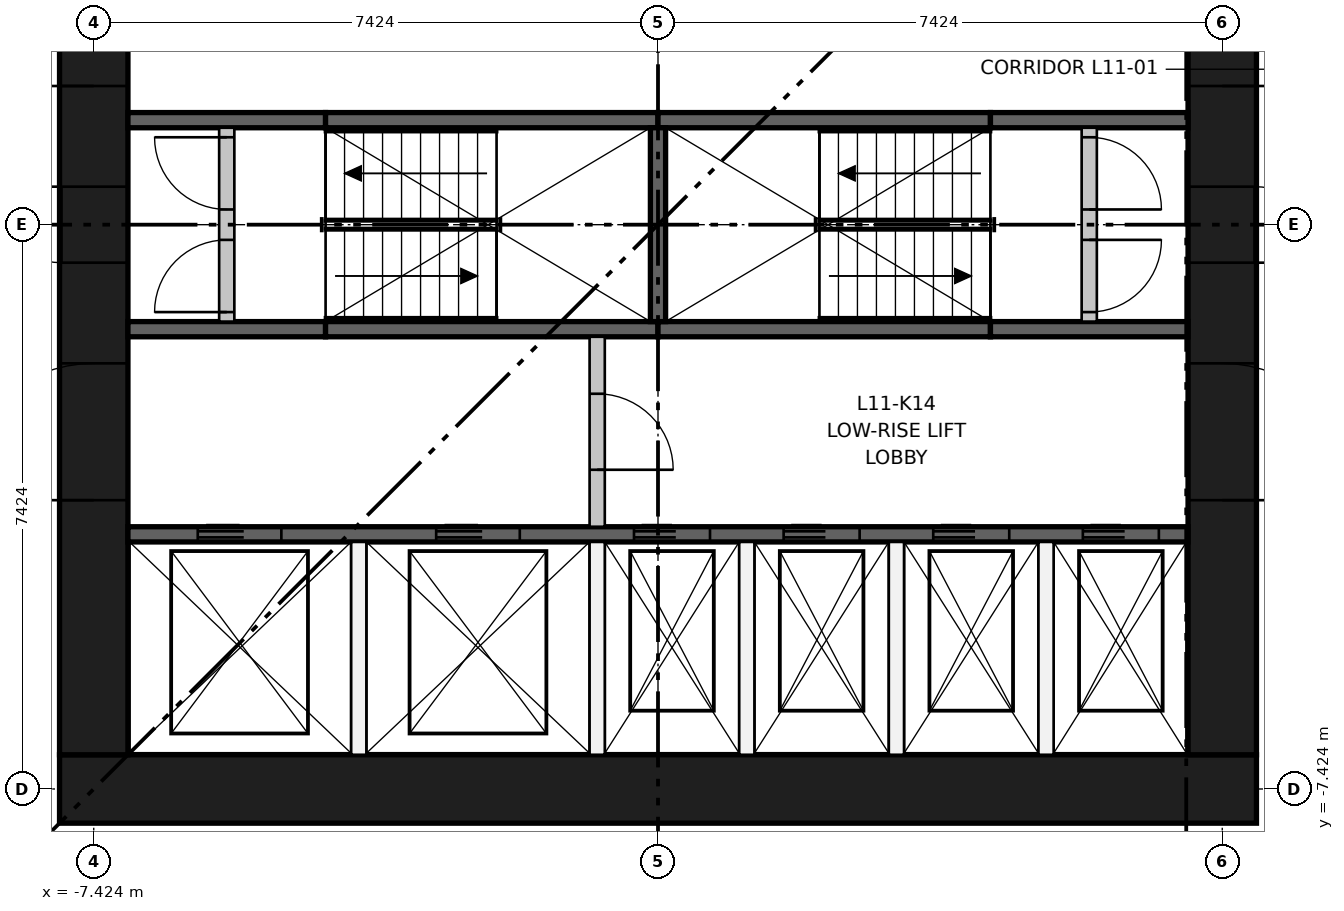
"""IFC4 building model, lengths in metres.
Left out: names, types, materials, properties, quantities, classifications, styles, units other than length and angle.
Written with IfcOpenShell. Run it as: python <this file> out.ifc"""

import sys

from ifc_helpers import new_model, si_unit, direction, frame, frame_2d, origin, place, context, subcontext, project, spatial, rectangle, extrude, element, fill, save


model = new_model("IFC4")
c1 = context("Model", 3, precision=1e-05, world=origin(), true_north=direction((0.0, 1.0)))
c2 = subcontext(c1, "Body", "Model", "MODEL_VIEW")
j1 = project(units=[si_unit("LENGTHUNIT", "METRE"), si_unit("PLANEANGLEUNIT", "RADIAN")], contexts=[c1])
p1 = place(None, origin())
s1 = spatial("IfcSite", under=j1, at=p1, CompositionType="ELEMENT")
p2 = place(p1, origin())
s2 = spatial("IfcBuilding", under=s1, at=p2, CompositionType="ELEMENT")
p3 = place(p2, frame((0.0, 0.0, 44.45)))
s3 = spatial("IfcBuildingStorey", under=s2, at=p3, CompositionType="ELEMENT", Elevation=44.45)
p4 = place(p3, frame((-7.874, -7.424, 0.0), z_axis=(0.0, 0.0, 1.0), x_axis=(1.0, 0.0, 0.0)))
e1 = element("IfcWall", 1, at=p4, inside=s3, PredefinedType="SHEAR", context=c2, shape_type="SweptSolid", body=[
    extrude(rectangle(XDim=15.748, YDim=0.9, at=frame_2d((7.874, 0.0))), origin(), (0.0, 0.0, 1.0), 3.65),
])
p5 = place(p3, frame((-7.424, -6.974, 0.0), z_axis=(0.0, 0.0, 1.0), x_axis=(0.0, 1.0, 0.0)))
e2 = element("IfcWall", 2, at=p5, inside=s3, PredefinedType="SHEAR", context=c2, shape_type="SweptSolid", body=[
    extrude(rectangle(XDim=13.948, YDim=0.9, at=frame_2d((6.974, 0.0))), origin(), (0.0, 0.0, 1.0), 3.65),
])
p6 = place(p5, frame((6.474, 0.0, 0.0)))
e3 = element("IfcOpeningElement", 3, at=p6, cuts=e2, PredefinedType="OPENING", context=c2, shape_type="SweptSolid", body=[
    extrude(rectangle(XDim=1.0, YDim=2.1, at=frame_2d((0.5, 1.05))), frame((0.0, 0.46, 0.0), z_axis=(0.0, -1.0, 0.0), x_axis=(1.0, 0.0, 0.0)), (0.0, 0.0, 1.0), 0.92),
])
p7 = place(p5, frame((3.35, 0.0, 0.0)))
e4 = element("IfcOpeningElement", 4, at=p7, cuts=e2, PredefinedType="OPENING", context=c2, shape_type="SweptSolid", body=[
    extrude(rectangle(XDim=1.8, YDim=2.1, at=frame_2d((0.9, 1.05))), frame((0.0, 0.46, 0.0), z_axis=(0.0, -1.0, 0.0), x_axis=(1.0, 0.0, 0.0)), (0.0, 0.0, 1.0), 0.92),
])
p8 = place(p5, frame((8.799, 0.0, 0.0)))
e5 = element("IfcOpeningElement", 5, at=p8, cuts=e2, PredefinedType="OPENING", context=c2, shape_type="SweptSolid", body=[
    extrude(rectangle(XDim=1.8, YDim=2.1, at=frame_2d((0.9, 1.05))), frame((0.0, 0.46, 0.0), z_axis=(0.0, -1.0, 0.0), x_axis=(1.0, 0.0, 0.0)), (0.0, 0.0, 1.0), 0.92),
])
p9 = place(p5, frame((11.974, 0.0, 0.0)))
e6 = element("IfcOpeningElement", 6, at=p9, cuts=e2, PredefinedType="OPENING", context=c2, shape_type="SweptSolid", body=[
    extrude(rectangle(XDim=1.0, YDim=2.1, at=frame_2d((0.5, 1.05))), frame((0.0, 0.46, 0.0), z_axis=(0.0, -1.0, 0.0), x_axis=(1.0, 0.0, 0.0)), (0.0, 0.0, 1.0), 0.92),
])
p10 = place(p3, frame((7.424, -6.974, 0.0), z_axis=(0.0, 0.0, 1.0), x_axis=(0.0, 1.0, 0.0)))
e7 = element("IfcWall", 7, at=p10, inside=s3, PredefinedType="SHEAR", context=c2, shape_type="SweptSolid", body=[
    extrude(rectangle(XDim=13.948, YDim=0.9, at=frame_2d((6.974, 0.0))), origin(), (0.0, 0.0, 1.0), 3.65),
])
p11 = place(p10, frame((6.474, 0.0, 0.0)))
e8 = element("IfcOpeningElement", 8, at=p11, cuts=e7, PredefinedType="OPENING", context=c2, shape_type="SweptSolid", body=[
    extrude(rectangle(XDim=1.0, YDim=2.1, at=frame_2d((0.5, 1.05))), frame((0.0, 0.46, 0.0), z_axis=(0.0, -1.0, 0.0), x_axis=(1.0, 0.0, 0.0)), (0.0, 0.0, 1.0), 0.92),
])
p12 = place(p10, frame((3.35, 0.0, 0.0)))
e9 = element("IfcOpeningElement", 9, at=p12, cuts=e7, PredefinedType="OPENING", context=c2, shape_type="SweptSolid", body=[
    extrude(rectangle(XDim=1.8, YDim=2.1, at=frame_2d((0.9, 1.05))), frame((0.0, 0.46, 0.0), z_axis=(0.0, -1.0, 0.0), x_axis=(1.0, 0.0, 0.0)), (0.0, 0.0, 1.0), 0.92),
])
p13 = place(p10, frame((8.799, 0.0, 0.0)))
e10 = element("IfcOpeningElement", 10, at=p13, cuts=e7, PredefinedType="OPENING", context=c2, shape_type="SweptSolid", body=[
    extrude(rectangle(XDim=1.8, YDim=2.1, at=frame_2d((0.9, 1.05))), frame((0.0, 0.46, 0.0), z_axis=(0.0, -1.0, 0.0), x_axis=(1.0, 0.0, 0.0)), (0.0, 0.0, 1.0), 0.92),
])
p14 = place(p3, frame((-6.974, -4.074, 0.0), z_axis=(0.0, 0.0, 1.0), x_axis=(1.0, 0.0, 0.0)))
e11 = element("IfcWall", 11, at=p14, inside=s3, PredefinedType="SHEAR", context=c2, shape_type="SweptSolid", body=[
    extrude(rectangle(XDim=13.948, YDim=0.2, at=frame_2d((6.974, 0.0))), origin(), (0.0, 0.0, 1.0), 3.3),
])
p15 = place(p14, frame((0.918, 0.0, 0.0)))
e12 = element("IfcOpeningElement", 12, at=p15, cuts=e11, PredefinedType="OPENING", context=c2, shape_type="SweptSolid", body=[
    extrude(rectangle(XDim=1.1, YDim=2.1, at=frame_2d((0.55, 1.05))), frame((0.0, 0.11, 0.0), z_axis=(0.0, -1.0, 0.0), x_axis=(1.0, 0.0, 0.0)), (0.0, 0.0, 1.0), 0.22),
])
p16 = place(p14, frame((4.055, 0.0, 0.0)))
e13 = element("IfcOpeningElement", 13, at=p16, cuts=e11, PredefinedType="OPENING", context=c2, shape_type="SweptSolid", body=[
    extrude(rectangle(XDim=1.1, YDim=2.1, at=frame_2d((0.55, 1.05))), frame((0.0, 0.11, 0.0), z_axis=(0.0, -1.0, 0.0), x_axis=(1.0, 0.0, 0.0)), (0.0, 0.0, 1.0), 0.22),
])
p17 = place(p14, frame((6.658, 0.0, 0.0)))
e14 = element("IfcOpeningElement", 14, at=p17, cuts=e11, PredefinedType="OPENING", context=c2, shape_type="SweptSolid", body=[
    extrude(rectangle(XDim=1.0, YDim=2.1, at=frame_2d((0.5, 1.05))), frame((0.0, 0.11, 0.0), z_axis=(0.0, -1.0, 0.0), x_axis=(1.0, 0.0, 0.0)), (0.0, 0.0, 1.0), 0.22),
])
p18 = place(p14, frame((8.627, 0.0, 0.0)))
e15 = element("IfcOpeningElement", 15, at=p18, cuts=e11, PredefinedType="OPENING", context=c2, shape_type="SweptSolid", body=[
    extrude(rectangle(XDim=1.0, YDim=2.1, at=frame_2d((0.5, 1.05))), frame((0.0, 0.11, 0.0), z_axis=(0.0, -1.0, 0.0), x_axis=(1.0, 0.0, 0.0)), (0.0, 0.0, 1.0), 0.22),
])
p19 = place(p14, frame((10.595, 0.0, 0.0)))
e16 = element("IfcOpeningElement", 16, at=p19, cuts=e11, PredefinedType="OPENING", context=c2, shape_type="SweptSolid", body=[
    extrude(rectangle(XDim=1.0, YDim=2.1, at=frame_2d((0.5, 1.05))), frame((0.0, 0.11, 0.0), z_axis=(0.0, -1.0, 0.0), x_axis=(1.0, 0.0, 0.0)), (0.0, 0.0, 1.0), 0.22),
])
p20 = place(p14, frame((12.564, 0.0, 0.0)))
e17 = element("IfcOpeningElement", 17, at=p20, cuts=e11, PredefinedType="OPENING", context=c2, shape_type="SweptSolid", body=[
    extrude(rectangle(XDim=1.0, YDim=2.1, at=frame_2d((0.5, 1.05))), frame((0.0, 0.11, 0.0), z_axis=(0.0, -1.0, 0.0), x_axis=(1.0, 0.0, 0.0)), (0.0, 0.0, 1.0), 0.22),
])
p21 = place(p3, frame((-6.974, -1.375, 0.0), z_axis=(0.0, 0.0, 1.0), x_axis=(1.0, 0.0, 0.0)))
e18 = element("IfcWall", 18, at=p21, inside=s3, PredefinedType="SHEAR", context=c2, shape_type="SweptSolid", body=[
    extrude(rectangle(XDim=2.6, YDim=0.2, at=frame_2d((1.3, 0.0))), origin(), (0.0, 0.0, 1.0), 3.3),
])
for number, where, z_axis, x_axis in (
    (19, (-4.374, -1.375, 0.0), (0.0, 0.0, 1.0), (1.0, 0.0, 0.0)),
    (20, (0.0, -1.375, 0.0), (0.0, 0.0, 1.0), (1.0, 0.0, 0.0)),
):
    element("IfcWall", number, at=place(p3, frame(where, z_axis=z_axis, x_axis=x_axis)), inside=s3, PredefinedType="SHEAR", context=c2, shape_type="SweptSolid", body=[
        extrude(rectangle(XDim=4.374, YDim=0.2, at=frame_2d((2.187, 0.0))), origin(), (0.0, 0.0, 1.0), 3.3),
    ])
for number, where, z_axis, x_axis in (
    (21, (4.374, -1.375, 0.0), (0.0, 0.0, 1.0), (1.0, 0.0, 0.0)),
    (22, (-6.974, 1.375, 0.0), (0.0, 0.0, 1.0), (1.0, 0.0, 0.0)),
):
    element("IfcWall", number, at=place(p3, frame(where, z_axis=z_axis, x_axis=x_axis)), inside=s3, PredefinedType="SHEAR", context=c2, shape_type="SweptSolid", body=[
        extrude(rectangle(XDim=2.6, YDim=0.2, at=frame_2d((1.3, 0.0))), origin(), (0.0, 0.0, 1.0), 3.3),
    ])
for number, where, z_axis, x_axis in (
    (23, (-4.374, 1.375, 0.0), (0.0, 0.0, 1.0), (1.0, 0.0, 0.0)),
    (24, (0.0, 1.375, 0.0), (0.0, 0.0, 1.0), (1.0, 0.0, 0.0)),
):
    element("IfcWall", number, at=place(p3, frame(where, z_axis=z_axis, x_axis=x_axis)), inside=s3, PredefinedType="SHEAR", context=c2, shape_type="SweptSolid", body=[
        extrude(rectangle(XDim=4.374, YDim=0.2, at=frame_2d((2.187, 0.0))), origin(), (0.0, 0.0, 1.0), 3.3),
    ])
p22 = place(p3, frame((4.374, 1.375, 0.0), z_axis=(0.0, 0.0, 1.0), x_axis=(1.0, 0.0, 0.0)))
e25 = element("IfcWall", 25, at=p22, inside=s3, PredefinedType="SHEAR", context=c2, shape_type="SweptSolid", body=[
    extrude(rectangle(XDim=2.6, YDim=0.2, at=frame_2d((1.3, 0.0))), origin(), (0.0, 0.0, 1.0), 3.3),
])
p23 = place(p3, frame((0.0, -1.275, 0.0), z_axis=(0.0, 0.0, 1.0), x_axis=(0.0, 1.0, 0.0)))
e26 = element("IfcWall", 26, at=p23, inside=s3, PredefinedType="SHEAR", context=c2, shape_type="SweptSolid", body=[
    extrude(rectangle(XDim=2.55, YDim=0.2, at=frame_2d((1.275, 0.0))), origin(), (0.0, 0.0, 1.0), 3.3),
])
for number, where, z_axis, x_axis in (
    (27, (-3.937, -6.974, 0.0), (0.0, 0.0, 1.0), (0.0, 1.0, 0.0)),
    (28, (-0.8, -6.974, 0.0), (0.0, 0.0, 1.0), (0.0, 1.0, 0.0)),
):
    element("IfcWall", number, at=place(p3, frame(where, z_axis=z_axis, x_axis=x_axis)), inside=s3, PredefinedType="PARTITIONING", context=c2, shape_type="SweptSolid", body=[
        extrude(rectangle(XDim=2.8, YDim=0.2, at=frame_2d((1.4, 0.0))), origin(), (0.0, 0.0, 1.0), 3.3),
    ])
p24 = place(p3, frame((-0.8, -3.974, 0.0), z_axis=(0.0, 0.0, 1.0), x_axis=(0.0, 1.0, 0.0)))
e29 = element("IfcWall", 29, at=p24, inside=s3, PredefinedType="PARTITIONING", context=c2, shape_type="SweptSolid", body=[
    extrude(rectangle(XDim=2.499, YDim=0.2, at=frame_2d((1.25, 0.0))), origin(), (0.0, 0.0, 1.0), 3.3),
])
p25 = place(p24, frame((0.75, 0.0, 0.0)))
e30 = element("IfcOpeningElement", 30, at=p25, cuts=e29, PredefinedType="OPENING", context=c2, shape_type="SweptSolid", body=[
    extrude(rectangle(XDim=1.0, YDim=2.1, at=frame_2d((0.5, 1.05))), frame((0.0, 0.11, 0.0), z_axis=(0.0, -1.0, 0.0), x_axis=(1.0, 0.0, 0.0)), (0.0, 0.0, 1.0), 0.22),
])
for number, where, z_axis, x_axis in (
    (31, (1.168, -6.974, 0.0), (0.0, 0.0, 1.0), (0.0, 1.0, 0.0)),
    (32, (3.137, -6.974, 0.0), (0.0, 0.0, 1.0), (0.0, 1.0, 0.0)),
    (33, (5.105, -6.974, 0.0), (0.0, 0.0, 1.0), (0.0, 1.0, 0.0)),
):
    element("IfcWall", number, at=place(p3, frame(where, z_axis=z_axis, x_axis=x_axis)), inside=s3, PredefinedType="PARTITIONING", context=c2, shape_type="SweptSolid", body=[
        extrude(rectangle(XDim=2.8, YDim=0.2, at=frame_2d((1.4, 0.0))), origin(), (0.0, 0.0, 1.0), 3.3),
    ])
p26 = place(p3, frame((-5.674, -1.275, 0.0), z_axis=(0.0, 0.0, 1.0), x_axis=(0.0, 1.0, 0.0)))
e34 = element("IfcWall", 34, at=p26, inside=s3, PredefinedType="PARTITIONING", context=c2, shape_type="SweptSolid", body=[
    extrude(rectangle(XDim=2.55, YDim=0.2, at=frame_2d((1.275, 0.0))), origin(), (0.0, 0.0, 1.0), 3.3),
])
p27 = place(p26, frame((0.125, 0.0, 0.0)))
e35 = element("IfcOpeningElement", 35, at=p27, cuts=e34, PredefinedType="OPENING", context=c2, shape_type="SweptSolid", body=[
    extrude(rectangle(XDim=0.95, YDim=2.1, at=frame_2d((0.475, 1.05))), frame((0.0, 0.11, 0.0), z_axis=(0.0, -1.0, 0.0), x_axis=(1.0, 0.0, 0.0)), (0.0, 0.0, 1.0), 0.22),
])
p28 = place(p26, frame((1.475, 0.0, 0.0)))
e36 = element("IfcOpeningElement", 36, at=p28, cuts=e34, PredefinedType="OPENING", context=c2, shape_type="SweptSolid", body=[
    extrude(rectangle(XDim=0.95, YDim=2.1, at=frame_2d((0.475, 1.05))), frame((0.0, 0.11, 0.0), z_axis=(0.0, -1.0, 0.0), x_axis=(1.0, 0.0, 0.0)), (0.0, 0.0, 1.0), 0.22),
])
p29 = place(p3, frame((5.674, -1.275, 0.0), z_axis=(0.0, 0.0, 1.0), x_axis=(0.0, 1.0, 0.0)))
e37 = element("IfcWall", 37, at=p29, inside=s3, PredefinedType="PARTITIONING", context=c2, shape_type="SweptSolid", body=[
    extrude(rectangle(XDim=2.55, YDim=0.2, at=frame_2d((1.275, 0.0))), origin(), (0.0, 0.0, 1.0), 3.3),
])
p30 = place(p29, frame((0.125, 0.0, 0.0)))
e38 = element("IfcOpeningElement", 38, at=p30, cuts=e37, PredefinedType="OPENING", context=c2, shape_type="SweptSolid", body=[
    extrude(rectangle(XDim=0.95, YDim=2.1, at=frame_2d((0.475, 1.05))), frame((0.0, 0.11, 0.0), z_axis=(0.0, -1.0, 0.0), x_axis=(1.0, 0.0, 0.0)), (0.0, 0.0, 1.0), 0.22),
])
p31 = place(p29, frame((1.475, 0.0, 0.0)))
e39 = element("IfcOpeningElement", 39, at=p31, cuts=e37, PredefinedType="OPENING", context=c2, shape_type="SweptSolid", body=[
    extrude(rectangle(XDim=0.95, YDim=2.1, at=frame_2d((0.475, 1.05))), frame((0.0, 0.11, 0.0), z_axis=(0.0, -1.0, 0.0), x_axis=(1.0, 0.0, 0.0)), (0.0, 0.0, 1.0), 0.22),
])
p32 = place(p15, origin())
e40 = element("IfcDoor", 40, at=p32, inside=s3, OperationType="DOUBLE_DOOR_SLIDING", PredefinedType="DOOR", context=c2, shape_type="SweptSolid", body=[
    extrude(rectangle(XDim=1.1, YDim=2.1, at=frame_2d((0.55, 1.05))), frame((0.0, 0.025, 0.0), z_axis=(0.0, -1.0, 0.0), x_axis=(1.0, 0.0, 0.0)), (0.0, 0.0, 1.0), 0.05),
])
fill(e12, e40)
p33 = place(p16, origin())
e41 = element("IfcDoor", 41, at=p33, inside=s3, OperationType="DOUBLE_DOOR_SLIDING", PredefinedType="DOOR", context=c2, shape_type="SweptSolid", body=[
    extrude(rectangle(XDim=1.1, YDim=2.1, at=frame_2d((0.55, 1.05))), frame((0.0, 0.025, 0.0), z_axis=(0.0, -1.0, 0.0), x_axis=(1.0, 0.0, 0.0)), (0.0, 0.0, 1.0), 0.05),
])
fill(e13, e41)
p34 = place(p17, origin())
e42 = element("IfcDoor", 42, at=p34, inside=s3, OperationType="DOUBLE_DOOR_SLIDING", PredefinedType="DOOR", context=c2, shape_type="SweptSolid", body=[
    extrude(rectangle(XDim=1.0, YDim=2.1, at=frame_2d((0.5, 1.05))), frame((0.0, 0.025, 0.0), z_axis=(0.0, -1.0, 0.0), x_axis=(1.0, 0.0, 0.0)), (0.0, 0.0, 1.0), 0.05),
])
fill(e14, e42)
p35 = place(p18, origin())
e43 = element("IfcDoor", 43, at=p35, inside=s3, OperationType="DOUBLE_DOOR_SLIDING", PredefinedType="DOOR", context=c2, shape_type="SweptSolid", body=[
    extrude(rectangle(XDim=1.0, YDim=2.1, at=frame_2d((0.5, 1.05))), frame((0.0, 0.025, 0.0), z_axis=(0.0, -1.0, 0.0), x_axis=(1.0, 0.0, 0.0)), (0.0, 0.0, 1.0), 0.05),
])
fill(e15, e43)
p36 = place(p19, origin())
e44 = element("IfcDoor", 44, at=p36, inside=s3, OperationType="DOUBLE_DOOR_SLIDING", PredefinedType="DOOR", context=c2, shape_type="SweptSolid", body=[
    extrude(rectangle(XDim=1.0, YDim=2.1, at=frame_2d((0.5, 1.05))), frame((0.0, 0.025, 0.0), z_axis=(0.0, -1.0, 0.0), x_axis=(1.0, 0.0, 0.0)), (0.0, 0.0, 1.0), 0.05),
])
fill(e16, e44)
p37 = place(p20, origin())
e45 = element("IfcDoor", 45, at=p37, inside=s3, OperationType="DOUBLE_DOOR_SLIDING", PredefinedType="DOOR", context=c2, shape_type="SweptSolid", body=[
    extrude(rectangle(XDim=1.0, YDim=2.1, at=frame_2d((0.5, 1.05))), frame((0.0, 0.025, 0.0), z_axis=(0.0, -1.0, 0.0), x_axis=(1.0, 0.0, 0.0)), (0.0, 0.0, 1.0), 0.05),
])
fill(e17, e45)
p38 = place(p27, origin())
e46 = element("IfcDoor", 46, at=p38, inside=s3, OperationType="SINGLE_SWING_LEFT", PredefinedType="DOOR", context=c2, shape_type="SweptSolid", body=[
    extrude(rectangle(XDim=0.95, YDim=2.1, at=frame_2d((0.475, 1.05))), frame((0.0, 0.025, 0.0), z_axis=(0.0, -1.0, 0.0), x_axis=(1.0, 0.0, 0.0)), (0.0, 0.0, 1.0), 0.05),
])
fill(e35, e46)
p39 = place(p28, origin())
e47 = element("IfcDoor", 47, at=p39, inside=s3, OperationType="SINGLE_SWING_RIGHT", PredefinedType="DOOR", context=c2, shape_type="SweptSolid", body=[
    extrude(rectangle(XDim=0.95, YDim=2.1, at=frame_2d((0.475, 1.05))), frame((0.0, 0.025, 0.0), z_axis=(0.0, -1.0, 0.0), x_axis=(1.0, 0.0, 0.0)), (0.0, 0.0, 1.0), 0.05),
])
fill(e36, e47)
p40 = place(p30, frame((0.95, 0.0, 0.0), z_axis=(0.0, 0.0, 1.0), x_axis=(-1.0, 0.0, 0.0)))
e48 = element("IfcDoor", 48, at=p40, inside=s3, OperationType="SINGLE_SWING_RIGHT", PredefinedType="DOOR", context=c2, shape_type="SweptSolid", body=[
    extrude(rectangle(XDim=0.95, YDim=2.1, at=frame_2d((0.475, 1.05))), frame((0.0, 0.025, 0.0), z_axis=(0.0, -1.0, 0.0), x_axis=(1.0, 0.0, 0.0)), (0.0, 0.0, 1.0), 0.05),
])
fill(e38, e48)
p41 = place(p31, frame((0.95, 0.0, 0.0), z_axis=(0.0, 0.0, 1.0), x_axis=(-1.0, 0.0, 0.0)))
e49 = element("IfcDoor", 49, at=p41, inside=s3, OperationType="SINGLE_SWING_LEFT", PredefinedType="DOOR", context=c2, shape_type="SweptSolid", body=[
    extrude(rectangle(XDim=0.95, YDim=2.1, at=frame_2d((0.475, 1.05))), frame((0.0, 0.025, 0.0), z_axis=(0.0, -1.0, 0.0), x_axis=(1.0, 0.0, 0.0)), (0.0, 0.0, 1.0), 0.05),
])
fill(e39, e49)
p42 = place(p25, frame((1.0, 0.0, 0.0), z_axis=(0.0, 0.0, 1.0), x_axis=(-1.0, 0.0, 0.0)))
e50 = element("IfcDoor", 50, at=p42, inside=s3, OperationType="SINGLE_SWING_LEFT", PredefinedType="DOOR", context=c2, shape_type="SweptSolid", body=[
    extrude(rectangle(XDim=1.0, YDim=2.1, at=frame_2d((0.5, 1.05))), frame((0.0, 0.025, 0.0), z_axis=(0.0, -1.0, 0.0), x_axis=(1.0, 0.0, 0.0)), (0.0, 0.0, 1.0), 0.05),
])
fill(e30, e50)
p43 = place(p6, origin())
e51 = element("IfcDoor", 51, at=p43, inside=s3, OperationType="SINGLE_SWING_RIGHT", PredefinedType="DOOR", context=c2, shape_type="SweptSolid", body=[
    extrude(rectangle(XDim=1.0, YDim=2.1, at=frame_2d((0.5, 1.05))), frame((0.0, 0.45, 0.0), z_axis=(0.0, -1.0, 0.0), x_axis=(1.0, 0.0, 0.0)), (0.0, 0.0, 1.0), 0.05),
])
fill(e3, e51)
p44 = place(p7, origin())
e52 = element("IfcDoor", 52, at=p44, inside=s3, OperationType="DOUBLE_DOOR_SINGLE_SWING", PredefinedType="DOOR", context=c2, shape_type="SweptSolid", body=[
    extrude(rectangle(XDim=1.8, YDim=2.1, at=frame_2d((0.9, 1.05))), frame((0.0, 0.025, 0.0), z_axis=(0.0, -1.0, 0.0), x_axis=(1.0, 0.0, 0.0)), (0.0, 0.0, 1.0), 0.05),
])
fill(e4, e52)
p45 = place(p8, origin())
e53 = element("IfcDoor", 53, at=p45, inside=s3, OperationType="DOUBLE_DOOR_SINGLE_SWING", PredefinedType="DOOR", context=c2, shape_type="SweptSolid", body=[
    extrude(rectangle(XDim=1.8, YDim=2.1, at=frame_2d((0.9, 1.05))), frame((0.0, 0.025, 0.0), z_axis=(0.0, -1.0, 0.0), x_axis=(1.0, 0.0, 0.0)), (0.0, 0.0, 1.0), 0.05),
])
fill(e5, e53)
p46 = place(p11, frame((1.0, 0.0, 0.0), z_axis=(0.0, 0.0, 1.0), x_axis=(-1.0, 0.0, 0.0)))
e54 = element("IfcDoor", 54, at=p46, inside=s3, OperationType="SINGLE_SWING_LEFT", PredefinedType="DOOR", context=c2, shape_type="SweptSolid", body=[
    extrude(rectangle(XDim=1.0, YDim=2.1, at=frame_2d((0.5, 1.05))), frame((0.0, 0.45, 0.0), z_axis=(0.0, -1.0, 0.0), x_axis=(1.0, 0.0, 0.0)), (0.0, 0.0, 1.0), 0.05),
])
fill(e8, e54)
p47 = place(p12, frame((1.8, 0.0, 0.0), z_axis=(0.0, 0.0, 1.0), x_axis=(-1.0, 0.0, 0.0)))
e55 = element("IfcDoor", 55, at=p47, inside=s3, OperationType="DOUBLE_DOOR_SINGLE_SWING", PredefinedType="DOOR", context=c2, shape_type="SweptSolid", body=[
    extrude(rectangle(XDim=1.8, YDim=2.1, at=frame_2d((0.9, 1.05))), frame((0.0, 0.025, 0.0), z_axis=(0.0, -1.0, 0.0), x_axis=(1.0, 0.0, 0.0)), (0.0, 0.0, 1.0), 0.05),
])
fill(e9, e55)
p48 = place(p13, frame((1.8, 0.0, 0.0), z_axis=(0.0, 0.0, 1.0), x_axis=(-1.0, 0.0, 0.0)))
e56 = element("IfcDoor", 56, at=p48, inside=s3, OperationType="DOUBLE_DOOR_SINGLE_SWING", PredefinedType="DOOR", context=c2, shape_type="SweptSolid", body=[
    extrude(rectangle(XDim=1.8, YDim=2.1, at=frame_2d((0.9, 1.05))), frame((0.0, 0.025, 0.0), z_axis=(0.0, -1.0, 0.0), x_axis=(1.0, 0.0, 0.0)), (0.0, 0.0, 1.0), 0.05),
])
fill(e10, e56)
save(model, sys.argv[1])
